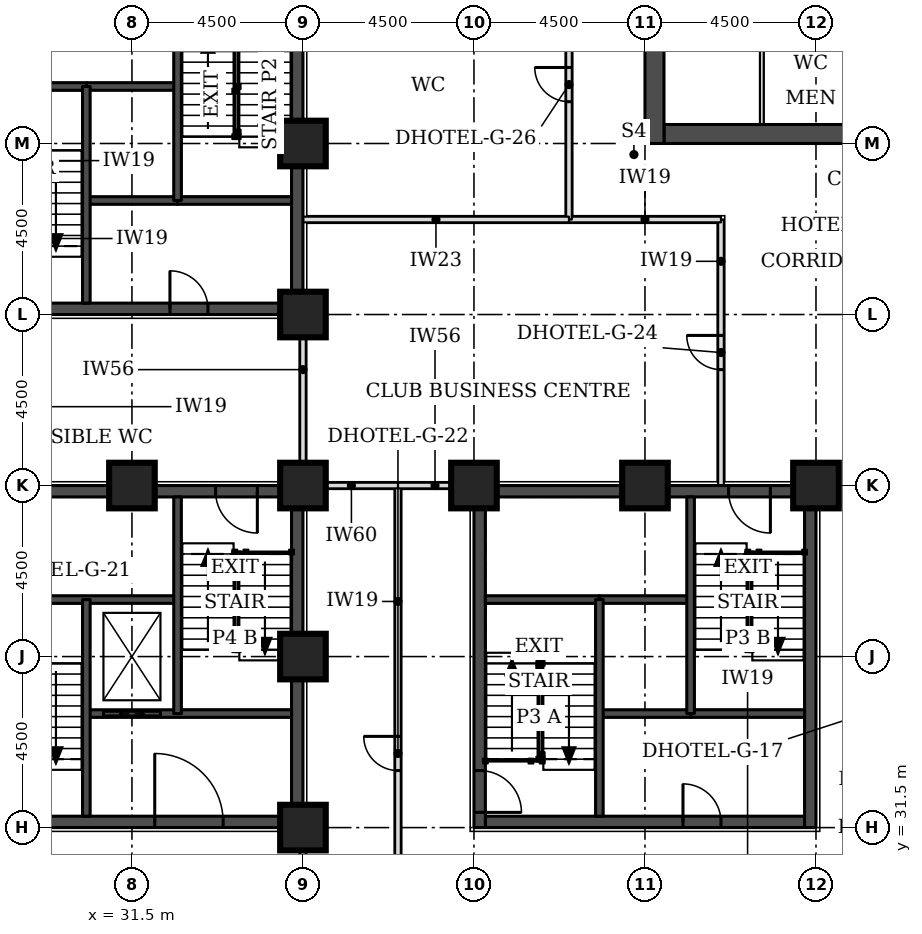
"""IFC4 building model, lengths in metres.
Left out: names, types, materials, properties, quantities, classifications, styles, units other than length and angle.
Written with IfcOpenShell. Run it as: python <this file> out.ifc"""

import sys

from ifc_helpers import new_model, si_unit, direction, frame, frame_2d, origin, origin_2d, place, context, subcontext, project, spatial, rectangle, extrude, element, fill, save


model = new_model("IFC4")
c1 = context("Model", 3, precision=1e-05, world=origin(), true_north=direction((0.0, 1.0)))
c2 = subcontext(c1, "Body", "Model", "MODEL_VIEW")
j1 = project(units=[si_unit("LENGTHUNIT", "METRE"), si_unit("PLANEANGLEUNIT", "RADIAN")], contexts=[c1])
p1 = place(None, origin())
s1 = spatial("IfcSite", under=j1, at=p1, CompositionType="ELEMENT")
p2 = place(p1, origin())
s2 = spatial("IfcBuilding", under=s1, at=p2, CompositionType="ELEMENT")
p3 = place(p2, frame((0.0, 0.0, 66.0)))
s3 = spatial("IfcBuildingStorey", under=s2, at=p3, CompositionType="ELEMENT", Elevation=66.0)
for number, where, z_axis, x_axis in (
    (1, (36.0, 31.5, 0.0), (0.0, 0.0, 1.0), (1.0, 0.0, 0.0)),
    (2, (36.0, 36.0, 0.0), (0.0, 0.0, 1.0), (1.0, 0.0, 0.0)),
    (3, (31.5, 40.5, 0.0), (0.0, 0.0, 1.0), (1.0, 0.0, 0.0)),
    (4, (36.0, 40.5, 0.0), (0.0, 0.0, 1.0), (1.0, 0.0, 0.0)),
    (5, (40.5, 40.5, 0.0), (0.0, 0.0, 1.0), (1.0, 0.0, 0.0)),
    (6, (45.0, 40.5, 0.0), (0.0, 0.0, 1.0), (1.0, 0.0, 0.0)),
    (7, (49.5, 40.5, 0.0), (0.0, 0.0, 1.0), (1.0, 0.0, 0.0)),
    (8, (36.0, 45.0, 0.0), (0.0, 0.0, 1.0), (1.0, 0.0, 0.0)),
    (9, (36.0, 49.5, 0.0), (0.0, 0.0, 1.0), (1.0, 0.0, 0.0)),
):
    element("IfcColumn", number, at=place(p3, frame(where, z_axis=z_axis, x_axis=x_axis)), inside=s3, PredefinedType="COLUMN", context=c2, shape_type="SweptSolid", body=[
        extrude(rectangle(XDim=1.2, YDim=1.2, at=origin_2d()), origin(), (0.0, 0.0, 1.0), 3.3),
    ])
p4 = place(p3, frame((45.5, 49.75, 0.0), z_axis=(0.0, 0.0, 1.0), x_axis=(1.0, 0.0, 0.0)))
e10 = element("IfcWall", 10, at=p4, inside=s3, PredefinedType="SHEAR", context=c2, shape_type="SweptSolid", body=[
    extrude(rectangle(XDim=21.5, YDim=0.5, at=frame_2d((10.75, 0.0))), origin(), (0.0, 0.0, 1.0), 3.3),
])
p5 = place(p3, frame((45.25, 49.5, 0.0), z_axis=(0.0, 0.0, 1.0), x_axis=(0.0, 1.0, 0.0)))
e11 = element("IfcWall", 11, at=p5, inside=s3, PredefinedType="SHEAR", context=c2, shape_type="SweptSolid", body=[
    extrude(rectangle(XDim=22.5, YDim=0.5, at=frame_2d((11.25, 0.0))), origin(), (0.0, 0.0, 1.0), 3.3),
])
p6 = place(p5, frame((4.2, 0.0, 0.0)))
e12 = element("IfcOpeningElement", 12, at=p6, cuts=e11, PredefinedType="OPENING", context=c2, shape_type="SweptSolid", body=[
    extrude(rectangle(XDim=1.8, YDim=2.1, at=frame_2d((0.9, 1.05))), frame((0.0, 0.26, 0.0), z_axis=(0.0, -1.0, 0.0), x_axis=(1.0, 0.0, 0.0)), (0.0, 0.0, 1.0), 0.52),
])
p7 = place(p5, frame((6.9, 0.0, 0.0)))
e13 = element("IfcOpeningElement", 13, at=p7, cuts=e11, PredefinedType="OPENING", context=c2, shape_type="SweptSolid", body=[
    extrude(rectangle(XDim=1.1, YDim=2.1, at=frame_2d((0.55, 1.05))), frame((0.0, 0.26, 0.0), z_axis=(0.0, -1.0, 0.0), x_axis=(1.0, 0.0, 0.0)), (0.0, 0.0, 1.0), 0.52),
])
p8 = place(p5, frame((13.6, 0.0, 0.0)))
e14 = element("IfcOpeningElement", 14, at=p8, cuts=e11, PredefinedType="OPENING", context=c2, shape_type="SweptSolid", body=[
    extrude(rectangle(XDim=1.1, YDim=2.1, at=frame_2d((0.55, 1.05))), frame((0.0, 0.26, 0.0), z_axis=(0.0, -1.0, 0.0), x_axis=(1.0, 0.0, 0.0)), (0.0, 0.0, 1.0), 0.52),
])
p9 = place(p5, frame((16.5, 0.0, 0.0)))
e15 = element("IfcOpeningElement", 15, at=p9, cuts=e11, PredefinedType="OPENING", context=c2, shape_type="SweptSolid", body=[
    extrude(rectangle(XDim=1.8, YDim=2.1, at=frame_2d((0.9, 1.05))), frame((0.0, 0.26, 0.0), z_axis=(0.0, -1.0, 0.0), x_axis=(1.0, 0.0, 0.0)), (0.0, 0.0, 1.0), 0.52),
])
p10 = place(p3, frame((27.3, 45.15, 0.0), z_axis=(0.0, 0.0, 1.0), x_axis=(1.0, 0.0, 0.0)))
e16 = element("IfcWall", 16, at=p10, inside=s3, PredefinedType="SHEAR", context=c2, shape_type="SweptSolid", body=[
    extrude(rectangle(XDim=8.4, YDim=0.3, at=frame_2d((4.2, 0.0))), origin(), (0.0, 0.0, 1.0), 3.3),
])
p11 = place(p10, frame((5.2, 0.0, 0.0)))
e17 = element("IfcOpeningElement", 17, at=p11, cuts=e16, PredefinedType="OPENING", context=c2, shape_type="SweptSolid", body=[
    extrude(rectangle(XDim=1.0, YDim=2.1, at=frame_2d((0.5, 1.05))), frame((0.0, 0.16, 0.0), z_axis=(0.0, -1.0, 0.0), x_axis=(1.0, 0.0, 0.0)), (0.0, 0.0, 1.0), 0.32),
])
p12 = place(p3, frame((35.85, 45.0, 0.0), z_axis=(0.0, 0.0, 1.0), x_axis=(0.0, 1.0, 0.0)))
e18 = element("IfcWall", 18, at=p12, inside=s3, PredefinedType="SHEAR", context=c2, shape_type="SweptSolid", body=[
    extrude(rectangle(XDim=9.0, YDim=0.3, at=frame_2d((4.5, 0.0))), origin(), (0.0, 0.0, 1.0), 3.3),
])
p13 = place(p3, frame((40.8, 31.65, 0.0), z_axis=(0.0, 0.0, 1.0), x_axis=(1.0, 0.0, 0.0)))
e19 = element("IfcWall", 19, at=p13, inside=s3, PredefinedType="SHEAR", context=c2, shape_type="SweptSolid", body=[
    extrude(rectangle(XDim=8.4, YDim=0.3, at=frame_2d((4.2, 0.0))), origin(), (0.0, 0.0, 1.0), 3.3),
])
p14 = place(p13, frame((5.2, 0.0, 0.0)))
e20 = element("IfcOpeningElement", 20, at=p14, cuts=e19, PredefinedType="OPENING", context=c2, shape_type="SweptSolid", body=[
    extrude(rectangle(XDim=1.0, YDim=2.1, at=frame_2d((0.5, 1.05))), frame((0.0, 0.16, 0.0), z_axis=(0.0, -1.0, 0.0), x_axis=(1.0, 0.0, 0.0)), (0.0, 0.0, 1.0), 0.32),
])
p15 = place(p3, frame((40.8, 40.35, 0.0), z_axis=(0.0, 0.0, 1.0), x_axis=(1.0, 0.0, 0.0)))
e21 = element("IfcWall", 21, at=p15, inside=s3, PredefinedType="SHEAR", context=c2, shape_type="SweptSolid", body=[
    extrude(rectangle(XDim=8.4, YDim=0.3, at=frame_2d((4.2, 0.0))), origin(), (0.0, 0.0, 1.0), 3.3),
])
p16 = place(p15, frame((6.4, 0.0, 0.0)))
e22 = element("IfcOpeningElement", 22, at=p16, cuts=e21, PredefinedType="OPENING", context=c2, shape_type="SweptSolid", body=[
    extrude(rectangle(XDim=1.1, YDim=2.1, at=frame_2d((0.55, 1.05))), frame((0.0, 0.16, 0.0), z_axis=(0.0, -1.0, 0.0), x_axis=(1.0, 0.0, 0.0)), (0.0, 0.0, 1.0), 0.32),
])
p17 = place(p3, frame((40.65, 31.5, 0.0), z_axis=(0.0, 0.0, 1.0), x_axis=(0.0, 1.0, 0.0)))
e23 = element("IfcWall", 23, at=p17, inside=s3, PredefinedType="SHEAR", context=c2, shape_type="SweptSolid", body=[
    extrude(rectangle(XDim=9.0, YDim=0.3, at=frame_2d((4.5, 0.0))), origin(), (0.0, 0.0, 1.0), 3.3),
])
p18 = place(p17, frame((0.4, 0.0, 0.0)))
e24 = element("IfcOpeningElement", 24, at=p18, cuts=e23, PredefinedType="OPENING", context=c2, shape_type="SweptSolid", body=[
    extrude(rectangle(XDim=1.1, YDim=2.1, at=frame_2d((0.55, 1.05))), frame((0.0, 0.16, 0.0), z_axis=(0.0, -1.0, 0.0), x_axis=(1.0, 0.0, 0.0)), (0.0, 0.0, 1.0), 0.32),
])
p19 = place(p3, frame((49.35, 31.5, 0.0), z_axis=(0.0, 0.0, 1.0), x_axis=(0.0, 1.0, 0.0)))
e25 = element("IfcWall", 25, at=p19, inside=s3, PredefinedType="SHEAR", context=c2, shape_type="SweptSolid", body=[
    extrude(rectangle(XDim=9.0, YDim=0.3, at=frame_2d((4.5, 0.0))), origin(), (0.0, 0.0, 1.0), 3.3),
])
p20 = place(p3, frame((27.3, 31.65, 0.0), z_axis=(0.0, 0.0, 1.0), x_axis=(1.0, 0.0, 0.0)))
e26 = element("IfcWall", 26, at=p20, inside=s3, PredefinedType="SHEAR", context=c2, shape_type="SweptSolid", body=[
    extrude(rectangle(XDim=8.4, YDim=0.3, at=frame_2d((4.2, 0.0))), origin(), (0.0, 0.0, 1.0), 3.3),
])
p21 = place(p20, frame((4.8, 0.0, 0.0)))
e27 = element("IfcOpeningElement", 27, at=p21, cuts=e26, PredefinedType="OPENING", context=c2, shape_type="SweptSolid", body=[
    extrude(rectangle(XDim=1.8, YDim=2.1, at=frame_2d((0.9, 1.05))), frame((0.0, 0.16, 0.0), z_axis=(0.0, -1.0, 0.0), x_axis=(1.0, 0.0, 0.0)), (0.0, 0.0, 1.0), 0.32),
])
p22 = place(p3, frame((27.3, 40.35, 0.0), z_axis=(0.0, 0.0, 1.0), x_axis=(1.0, 0.0, 0.0)))
e28 = element("IfcWall", 28, at=p22, inside=s3, PredefinedType="SHEAR", context=c2, shape_type="SweptSolid", body=[
    extrude(rectangle(XDim=8.4, YDim=0.3, at=frame_2d((4.2, 0.0))), origin(), (0.0, 0.0, 1.0), 3.3),
])
p23 = place(p22, frame((6.4, 0.0, 0.0)))
e29 = element("IfcOpeningElement", 29, at=p23, cuts=e28, PredefinedType="OPENING", context=c2, shape_type="SweptSolid", body=[
    extrude(rectangle(XDim=1.1, YDim=2.1, at=frame_2d((0.55, 1.05))), frame((0.0, 0.16, 0.0), z_axis=(0.0, -1.0, 0.0), x_axis=(1.0, 0.0, 0.0)), (0.0, 0.0, 1.0), 0.32),
])
p24 = place(p3, frame((35.85, 31.5, 0.0), z_axis=(0.0, 0.0, 1.0), x_axis=(0.0, 1.0, 0.0)))
e30 = element("IfcWall", 30, at=p24, inside=s3, PredefinedType="SHEAR", context=c2, shape_type="SweptSolid", body=[
    extrude(rectangle(XDim=9.0, YDim=0.3, at=frame_2d((4.5, 0.0))), origin(), (0.0, 0.0, 1.0), 3.3),
])
p25 = place(p3, frame((38.5, 26.4, 0.0), z_axis=(0.0, 0.0, 1.0), x_axis=(0.0, 1.0, 0.0)))
e31 = element("IfcWall", 31, at=p25, inside=s3, PredefinedType="PARTITIONING", context=c2, shape_type="SweptSolid", body=[
    extrude(rectangle(XDim=14.1, YDim=0.15, at=frame_2d((7.05, 0.0))), origin(), (0.0, 0.0, 1.0), 3.08),
])
p26 = place(p25, frame((6.6, 0.0, 0.0)))
e32 = element("IfcOpeningElement", 32, at=p26, cuts=e31, PredefinedType="OPENING", context=c2, shape_type="SweptSolid", body=[
    extrude(rectangle(XDim=0.9, YDim=2.1, at=frame_2d((0.45, 1.05))), frame((0.0, 0.085, 0.0), z_axis=(0.0, -1.0, 0.0), x_axis=(1.0, 0.0, 0.0)), (0.0, 0.0, 1.0), 0.17),
])
for number, where, z_axis, x_axis in (
    (33, (36.0, 29.5, 0.0), (0.0, 0.0, 1.0), (0.0, 1.0, 0.0)),
    (34, (38.5, 40.5, 0.0), (0.0, 0.0, 1.0), (1.0, 0.0, 0.0)),
):
    element("IfcWall", number, at=place(p3, frame(where, z_axis=z_axis, x_axis=x_axis)), inside=s3, PredefinedType="PARTITIONING", context=c2, shape_type="SweptSolid", body=[
        extrude(rectangle(XDim=1.95, YDim=0.15, at=frame_2d((0.975, 0.0))), origin(), (0.0, 0.0, 1.0), 2.33),
    ])
p27 = place(p3, frame((36.0, 40.55, 0.0), z_axis=(0.0, 0.0, 1.0), x_axis=(0.0, 1.0, 0.0)))
e35 = element("IfcWall", 35, at=p27, inside=s3, PredefinedType="PARTITIONING", context=c2, shape_type="SweptSolid", body=[
    extrude(rectangle(XDim=4.4, YDim=0.15, at=frame_2d((2.2, 0.0))), origin(), (0.0, 0.0, 1.0), 2.33),
])
p28 = place(p3, frame((47.0, 40.5, 0.0), z_axis=(0.0, 0.0, 1.0), x_axis=(0.0, 1.0, 0.0)))
e36 = element("IfcWall", 36, at=p28, inside=s3, PredefinedType="PARTITIONING", context=c2, shape_type="SweptSolid", body=[
    extrude(rectangle(XDim=7.0, YDim=0.15, at=frame_2d((3.5, 0.0))), origin(), (0.0, 0.0, 1.0), 3.08),
])
p29 = place(p28, frame((3.05, 0.0, 0.0)))
e37 = element("IfcOpeningElement", 37, at=p29, cuts=e36, PredefinedType="OPENING", context=c2, shape_type="SweptSolid", body=[
    extrude(rectangle(XDim=0.9, YDim=2.1, at=frame_2d((0.45, 1.05))), frame((0.0, 0.085, 0.0), z_axis=(0.0, -1.0, 0.0), x_axis=(1.0, 0.0, 0.0)), (0.0, 0.0, 1.0), 0.17),
])
p30 = place(p3, frame((43.0, 47.5, 0.0), z_axis=(0.0, 0.0, 1.0), x_axis=(1.0, 0.0, 0.0)))
e38 = element("IfcWall", 38, at=p30, inside=s3, PredefinedType="PARTITIONING", context=c2, shape_type="SweptSolid", body=[
    extrude(rectangle(XDim=4.0, YDim=0.15, at=frame_2d((2.0, 0.0))), origin(), (0.0, 0.0, 1.0), 3.08),
])
p31 = place(p3, frame((43.0, 47.5, 0.0), z_axis=(0.0, 0.0, 1.0), x_axis=(0.0, 1.0, 0.0)))
e39 = element("IfcWall", 39, at=p31, inside=s3, PredefinedType="PARTITIONING", context=c2, shape_type="SweptSolid", body=[
    extrude(rectangle(XDim=7.1, YDim=0.15, at=frame_2d((3.55, 0.0))), origin(), (0.0, 0.0, 1.0), 3.08),
])
p32 = place(p31, frame((3.1, 0.0, 0.0)))
e40 = element("IfcOpeningElement", 40, at=p32, cuts=e39, PredefinedType="OPENING", context=c2, shape_type="SweptSolid", body=[
    extrude(rectangle(XDim=0.9, YDim=2.1, at=frame_2d((0.45, 1.05))), frame((0.0, 0.085, 0.0), z_axis=(0.0, -1.0, 0.0), x_axis=(1.0, 0.0, 0.0)), (0.0, 0.0, 1.0), 0.17),
])
p33 = place(p3, frame((36.05, 40.5, 0.0), z_axis=(0.0, 0.0, 1.0), x_axis=(1.0, 0.0, 0.0)))
e41 = element("IfcWall", 41, at=p33, inside=s3, PredefinedType="PARTITIONING", context=c2, shape_type="SweptSolid", body=[
    extrude(rectangle(XDim=2.45, YDim=0.15, at=frame_2d((1.225, 0.0))), origin(), (0.0, 0.0, 1.0), 2.33),
])
p34 = place(p3, frame((36.0, 47.5, 0.0), z_axis=(0.0, 0.0, 1.0), x_axis=(1.0, 0.0, 0.0)))
e42 = element("IfcWall", 42, at=p34, inside=s3, PredefinedType="PARTITIONING", context=c2, shape_type="SweptSolid", body=[
    extrude(rectangle(XDim=7.0, YDim=0.15, at=frame_2d((3.5, 0.0))), origin(), (0.0, 0.0, 1.0), 3.08),
])
p35 = place(p3, frame((48.075, 50.0, 0.0), z_axis=(0.0, 0.0, 1.0), x_axis=(0.0, 1.0, 0.0)))
e43 = element("IfcWall", 43, at=p35, inside=s3, PredefinedType="PARTITIONING", context=c2, shape_type="SweptSolid", body=[
    extrude(rectangle(XDim=3.0, YDim=0.1, at=frame_2d((1.5, 0.0))), origin(), (0.0, 0.0, 1.0), 3.08),
])
p36 = place(p3, frame((30.3, 48.0, 0.0), z_axis=(0.0, 0.0, 1.0), x_axis=(1.0, 0.0, 0.0)))
e44 = element("IfcWall", 44, at=p36, inside=s3, PredefinedType="SOLIDWALL", context=c2, shape_type="SweptSolid", body=[
    extrude(rectangle(XDim=2.4, YDim=0.2, at=frame_2d((1.2, 0.0))), origin(), (0.0, 0.0, 1.0), 3.08),
])
p37 = place(p3, frame((32.7, 48.0, 0.0), z_axis=(0.0, 0.0, 1.0), x_axis=(1.0, 0.0, 0.0)))
e45 = element("IfcWall", 45, at=p37, inside=s3, PredefinedType="SOLIDWALL", context=c2, shape_type="SweptSolid", body=[
    extrude(rectangle(XDim=3.0, YDim=0.2, at=frame_2d((1.5, 0.0))), origin(), (0.0, 0.0, 1.0), 3.08),
])
p38 = place(p3, frame((30.3, 51.0, 0.0), z_axis=(0.0, 0.0, 1.0), x_axis=(1.0, 0.0, 0.0)))
e46 = element("IfcWall", 46, at=p38, inside=s3, PredefinedType="SOLIDWALL", context=c2, shape_type="SweptSolid", body=[
    extrude(rectangle(XDim=2.4, YDim=0.2, at=frame_2d((1.2, 0.0))), origin(), (0.0, 0.0, 1.0), 3.3),
])
p39 = place(p3, frame((27.3, 51.0, 0.0), z_axis=(0.0, 0.0, 1.0), x_axis=(1.0, 0.0, 0.0)))
e47 = element("IfcWall", 47, at=p39, inside=s3, PredefinedType="SOLIDWALL", context=c2, shape_type="SweptSolid", body=[
    extrude(rectangle(XDim=3.0, YDim=0.2, at=frame_2d((1.5, 0.0))), origin(), (0.0, 0.0, 1.0), 3.08),
])
for number, where, z_axis, x_axis in (
    (48, (30.3, 45.3, 0.0), (0.0, 0.0, 1.0), (0.0, 1.0, 0.0)),
    (49, (32.7, 48.0, 0.0), (0.0, 0.0, 1.0), (0.0, 1.0, 0.0)),
):
    element("IfcWall", number, at=place(p3, frame(where, z_axis=z_axis, x_axis=x_axis)), inside=s3, PredefinedType="SOLIDWALL", context=c2, shape_type="SweptSolid", body=[
        extrude(rectangle(XDim=5.7, YDim=0.2, at=frame_2d((2.85, 0.0))), origin(), (0.0, 0.0, 1.0), 3.08),
    ])
p40 = place(p3, frame((43.8, 34.5, 0.0), z_axis=(0.0, 0.0, 1.0), x_axis=(1.0, 0.0, 0.0)))
e50 = element("IfcWall", 50, at=p40, inside=s3, PredefinedType="SOLIDWALL", context=c2, shape_type="SweptSolid", body=[
    extrude(rectangle(XDim=2.4, YDim=0.2, at=frame_2d((1.2, 0.0))), origin(), (0.0, 0.0, 1.0), 3.08),
])
p41 = place(p3, frame((46.2, 34.5, 0.0), z_axis=(0.0, 0.0, 1.0), x_axis=(1.0, 0.0, 0.0)))
e51 = element("IfcWall", 51, at=p41, inside=s3, PredefinedType="SOLIDWALL", context=c2, shape_type="SweptSolid", body=[
    extrude(rectangle(XDim=3.0, YDim=0.2, at=frame_2d((1.5, 0.0))), origin(), (0.0, 0.0, 1.0), 3.08),
])
p42 = place(p3, frame((43.8, 37.5, 0.0), z_axis=(0.0, 0.0, 1.0), x_axis=(1.0, 0.0, 0.0)))
e52 = element("IfcWall", 52, at=p42, inside=s3, PredefinedType="SOLIDWALL", context=c2, shape_type="SweptSolid", body=[
    extrude(rectangle(XDim=2.4, YDim=0.2, at=frame_2d((1.2, 0.0))), origin(), (0.0, 0.0, 1.0), 3.3),
])
p43 = place(p3, frame((40.8, 37.5, 0.0), z_axis=(0.0, 0.0, 1.0), x_axis=(1.0, 0.0, 0.0)))
e53 = element("IfcWall", 53, at=p43, inside=s3, PredefinedType="SOLIDWALL", context=c2, shape_type="SweptSolid", body=[
    extrude(rectangle(XDim=3.0, YDim=0.2, at=frame_2d((1.5, 0.0))), origin(), (0.0, 0.0, 1.0), 3.08),
])
for number, where, z_axis, x_axis in (
    (54, (43.8, 31.8, 0.0), (0.0, 0.0, 1.0), (0.0, 1.0, 0.0)),
    (55, (46.2, 34.5, 0.0), (0.0, 0.0, 1.0), (0.0, 1.0, 0.0)),
):
    element("IfcWall", number, at=place(p3, frame(where, z_axis=z_axis, x_axis=x_axis)), inside=s3, PredefinedType="SOLIDWALL", context=c2, shape_type="SweptSolid", body=[
        extrude(rectangle(XDim=5.7, YDim=0.2, at=frame_2d((2.85, 0.0))), origin(), (0.0, 0.0, 1.0), 3.08),
    ])
p44 = place(p3, frame((30.3, 34.5, 0.0), z_axis=(0.0, 0.0, 1.0), x_axis=(1.0, 0.0, 0.0)))
e56 = element("IfcWall", 56, at=p44, inside=s3, PredefinedType="SOLIDWALL", context=c2, shape_type="SweptSolid", body=[
    extrude(rectangle(XDim=5.4, YDim=0.2, at=frame_2d((2.7, 0.0))), origin(), (0.0, 0.0, 1.0), 3.08),
])
p45 = place(p44, frame((0.45, 0.0, 0.0)))
e57 = element("IfcOpeningElement", 57, at=p45, cuts=e56, PredefinedType="OPENING", context=c2, shape_type="SweptSolid", body=[
    extrude(rectangle(XDim=1.5, YDim=2.1, at=frame_2d((0.75, 1.05))), frame((0.0, 0.11, 0.0), z_axis=(0.0, -1.0, 0.0), x_axis=(1.0, 0.0, 0.0)), (0.0, 0.0, 1.0), 0.22),
])
p46 = place(p3, frame((27.3, 37.5, 0.0), z_axis=(0.0, 0.0, 1.0), x_axis=(1.0, 0.0, 0.0)))
e58 = element("IfcWall", 58, at=p46, inside=s3, PredefinedType="SOLIDWALL", context=c2, shape_type="SweptSolid", body=[
    extrude(rectangle(XDim=5.4, YDim=0.2, at=frame_2d((2.7, 0.0))), origin(), (0.0, 0.0, 1.0), 3.08),
])
for number, where, z_axis, x_axis in (
    (59, (30.3, 31.8, 0.0), (0.0, 0.0, 1.0), (0.0, 1.0, 0.0)),
    (60, (32.7, 34.5, 0.0), (0.0, 0.0, 1.0), (0.0, 1.0, 0.0)),
):
    element("IfcWall", number, at=place(p3, frame(where, z_axis=z_axis, x_axis=x_axis)), inside=s3, PredefinedType="SOLIDWALL", context=c2, shape_type="SweptSolid", body=[
        extrude(rectangle(XDim=5.7, YDim=0.2, at=frame_2d((2.85, 0.0))), origin(), (0.0, 0.0, 1.0), 3.08),
    ])
p47 = place(p26, origin())
e61 = element("IfcDoor", 61, at=p47, inside=s3, OperationType="SINGLE_SWING_RIGHT", PredefinedType="DOOR", context=c2, shape_type="SweptSolid", body=[
    extrude(rectangle(XDim=0.9, YDim=2.1, at=frame_2d((0.45, 1.05))), frame((0.0, 0.025, 0.0), z_axis=(0.0, -1.0, 0.0), x_axis=(1.0, 0.0, 0.0)), (0.0, 0.0, 1.0), 0.05),
])
fill(e32, e61)
p48 = place(p32, origin())
e62 = element("IfcDoor", 62, at=p48, inside=s3, OperationType="SINGLE_SWING_RIGHT", PredefinedType="DOOR", context=c2, shape_type="SweptSolid", body=[
    extrude(rectangle(XDim=0.9, YDim=2.1, at=frame_2d((0.45, 1.05))), frame((0.0, 0.025, 0.0), z_axis=(0.0, -1.0, 0.0), x_axis=(1.0, 0.0, 0.0)), (0.0, 0.0, 1.0), 0.05),
])
fill(e40, e62)
p49 = place(p29, origin())
e63 = element("IfcDoor", 63, at=p49, inside=s3, OperationType="SINGLE_SWING_RIGHT", PredefinedType="DOOR", context=c2, shape_type="SweptSolid", body=[
    extrude(rectangle(XDim=0.9, YDim=2.1, at=frame_2d((0.45, 1.05))), frame((0.0, 0.025, 0.0), z_axis=(0.0, -1.0, 0.0), x_axis=(1.0, 0.0, 0.0)), (0.0, 0.0, 1.0), 0.05),
])
fill(e37, e63)
p50 = place(p11, origin())
e64 = element("IfcDoor", 64, at=p50, inside=s3, OperationType="SINGLE_SWING_LEFT", PredefinedType="DOOR", context=c2, shape_type="SweptSolid", body=[
    extrude(rectangle(XDim=1.0, YDim=2.1, at=frame_2d((0.5, 1.05))), frame((0.0, 0.025, 0.0), z_axis=(0.0, -1.0, 0.0), x_axis=(1.0, 0.0, 0.0)), (0.0, 0.0, 1.0), 0.05),
])
fill(e17, e64)
p51 = place(p18, frame((1.1, 0.0, 0.0), z_axis=(0.0, 0.0, 1.0), x_axis=(-1.0, 0.0, 0.0)))
e65 = element("IfcDoor", 65, at=p51, inside=s3, OperationType="SINGLE_SWING_RIGHT", PredefinedType="DOOR", context=c2, shape_type="SweptSolid", body=[
    extrude(rectangle(XDim=1.1, YDim=2.1, at=frame_2d((0.55, 1.05))), frame((0.0, 0.025, 0.0), z_axis=(0.0, -1.0, 0.0), x_axis=(1.0, 0.0, 0.0)), (0.0, 0.0, 1.0), 0.05),
])
fill(e24, e65)
p52 = place(p16, frame((1.1, 0.0, 0.0), z_axis=(0.0, 0.0, 1.0), x_axis=(-1.0, 0.0, 0.0)))
e66 = element("IfcDoor", 66, at=p52, inside=s3, OperationType="SINGLE_SWING_LEFT", PredefinedType="DOOR", context=c2, shape_type="SweptSolid", body=[
    extrude(rectangle(XDim=1.1, YDim=2.1, at=frame_2d((0.55, 1.05))), frame((0.0, 0.025, 0.0), z_axis=(0.0, -1.0, 0.0), x_axis=(1.0, 0.0, 0.0)), (0.0, 0.0, 1.0), 0.05),
])
fill(e22, e66)
p53 = place(p14, origin())
e67 = element("IfcDoor", 67, at=p53, inside=s3, OperationType="SINGLE_SWING_LEFT", PredefinedType="DOOR", context=c2, shape_type="SweptSolid", body=[
    extrude(rectangle(XDim=1.0, YDim=2.1, at=frame_2d((0.5, 1.05))), frame((0.0, 0.025, 0.0), z_axis=(0.0, -1.0, 0.0), x_axis=(1.0, 0.0, 0.0)), (0.0, 0.0, 1.0), 0.05),
])
fill(e20, e67)
p54 = place(p23, frame((1.1, 0.0, 0.0), z_axis=(0.0, 0.0, 1.0), x_axis=(-1.0, 0.0, 0.0)))
e68 = element("IfcDoor", 68, at=p54, inside=s3, OperationType="SINGLE_SWING_LEFT", PredefinedType="DOOR", context=c2, shape_type="SweptSolid", body=[
    extrude(rectangle(XDim=1.1, YDim=2.1, at=frame_2d((0.55, 1.05))), frame((0.0, 0.025, 0.0), z_axis=(0.0, -1.0, 0.0), x_axis=(1.0, 0.0, 0.0)), (0.0, 0.0, 1.0), 0.05),
])
fill(e29, e68)
p55 = place(p45, origin())
e69 = element("IfcDoor", 69, at=p55, inside=s3, OperationType="DOUBLE_DOOR_SLIDING", PredefinedType="DOOR", context=c2, shape_type="SweptSolid", body=[
    extrude(rectangle(XDim=1.5, YDim=2.1, at=frame_2d((0.75, 1.05))), frame((0.0, 0.025, 0.0), z_axis=(0.0, -1.0, 0.0), x_axis=(1.0, 0.0, 0.0)), (0.0, 0.0, 1.0), 0.05),
])
fill(e57, e69)
p56 = place(p21, origin())
e70 = element("IfcDoor", 70, at=p56, inside=s3, OperationType="SINGLE_SWING_LEFT", PredefinedType="DOOR", context=c2, shape_type="SweptSolid", body=[
    extrude(rectangle(XDim=1.8, YDim=2.1, at=frame_2d((0.9, 1.05))), frame((0.0, 0.025, 0.0), z_axis=(0.0, -1.0, 0.0), x_axis=(1.0, 0.0, 0.0)), (0.0, 0.0, 1.0), 0.05),
])
fill(e27, e70)
save(model, sys.argv[1])
